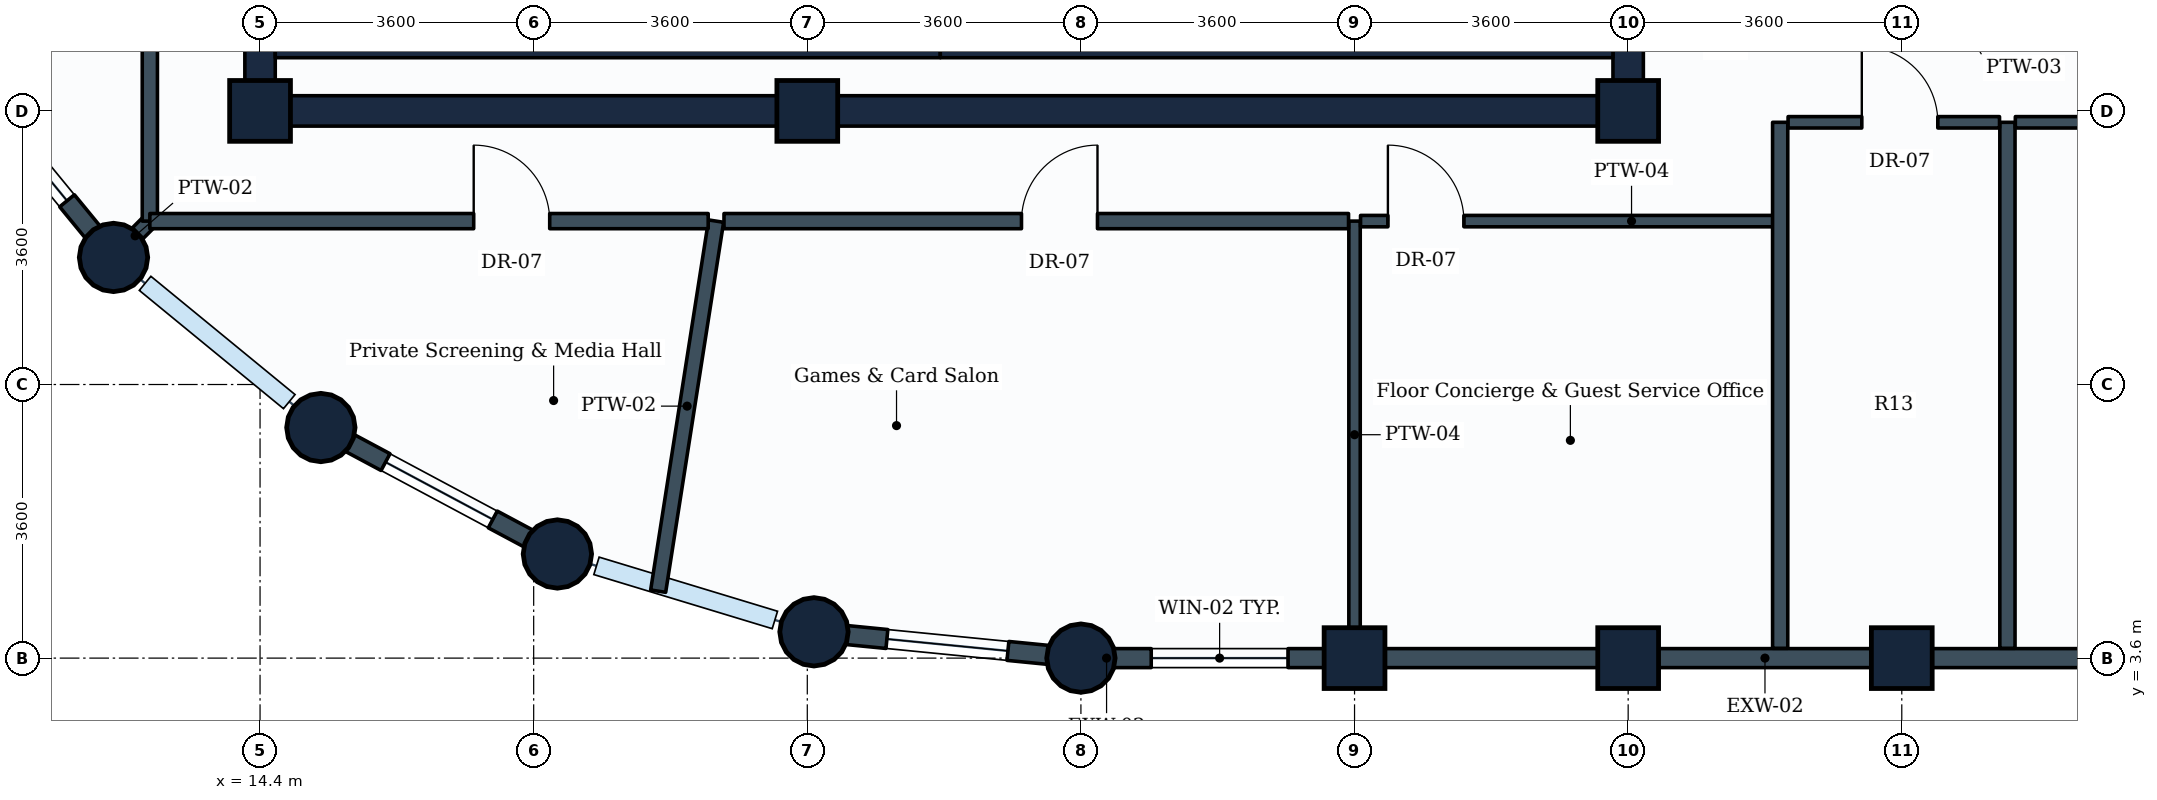
"""IFC4 building model, lengths in metres.
Left out: names, types, materials, properties, quantities, classifications, styles, units other than length and angle.
Written with IfcOpenShell. Run it as: python <this file> out.ifc"""

import sys

from ifc_helpers import new_model, si_unit, direction, frame, frame_2d, origin, origin_2d, place, context, subcontext, project, spatial, rectangle, circle, extrude, element, fill, save


model = new_model("IFC4")
c1 = context("Model", 3, precision=1e-05, world=origin(), true_north=direction((0.0, 1.0)))
c2 = subcontext(c1, "Body", "Model", "MODEL_VIEW")
j1 = project(units=[si_unit("LENGTHUNIT", "METRE"), si_unit("PLANEANGLEUNIT", "RADIAN")], contexts=[c1])
p1 = place(None, origin())
s1 = spatial("IfcSite", under=j1, at=p1, CompositionType="ELEMENT")
p2 = place(p1, origin())
s2 = spatial("IfcBuilding", under=s1, at=p2, CompositionType="ELEMENT")
p3 = place(p2, frame((0.0, 0.0, 228.2)))
s3 = spatial("IfcBuildingStorey", under=s2, at=p3, CompositionType="ELEMENT", Elevation=228.2)
p4 = place(p3, frame((12.472, 8.872, 0.0), z_axis=(0.0, 0.0, 1.0), x_axis=(1.0, 0.0, 0.0)))
e1 = element("IfcColumn", 1, at=p4, inside=s3, PredefinedType="COLUMN", context=c2, shape_type="SweptSolid", body=[
    extrude(circle(Radius=0.45, at=origin_2d()), origin(), (0.0, 0.0, 1.0), 3.6),
])
p5 = place(p3, frame((14.4, 10.8, 0.0), z_axis=(0.0, 0.0, 1.0), x_axis=(1.0, 0.0, 0.0)))
e2 = element("IfcColumn", 2, at=p5, inside=s3, PredefinedType="COLUMN", context=c2, shape_type="SweptSolid", body=[
    extrude(rectangle(XDim=0.8, YDim=0.8, at=origin_2d()), origin(), (0.0, 0.0, 1.0), 3.6),
])
for number, where, z_axis, x_axis in (
    (3, (15.2, 6.634, 0.0), (0.0, 0.0, 1.0), (1.0, 0.0, 0.0)),
    (4, (18.312, 4.97, 0.0), (0.0, 0.0, 1.0), (1.0, 0.0, 0.0)),
):
    element("IfcColumn", number, at=place(p3, frame(where, z_axis=z_axis, x_axis=x_axis)), inside=s3, PredefinedType="COLUMN", context=c2, shape_type="SweptSolid", body=[
        extrude(circle(Radius=0.45, at=origin_2d()), origin(), (0.0, 0.0, 1.0), 3.6),
    ])
p6 = place(p3, frame((21.6, 10.8, 0.0), z_axis=(0.0, 0.0, 1.0), x_axis=(1.0, 0.0, 0.0)))
e5 = element("IfcColumn", 5, at=p6, inside=s3, PredefinedType="COLUMN", context=c2, shape_type="SweptSolid", body=[
    extrude(rectangle(XDim=0.8, YDim=0.8, at=origin_2d()), origin(), (0.0, 0.0, 1.0), 3.6),
])
for number, where, z_axis, x_axis in (
    (6, (21.688, 3.946, 0.0), (0.0, 0.0, 1.0), (1.0, 0.0, 0.0)),
    (7, (25.2, 3.6, 0.0), (0.0, 0.0, 1.0), (1.0, 0.0, 0.0)),
):
    element("IfcColumn", number, at=place(p3, frame(where, z_axis=z_axis, x_axis=x_axis)), inside=s3, PredefinedType="COLUMN", context=c2, shape_type="SweptSolid", body=[
        extrude(circle(Radius=0.45, at=origin_2d()), origin(), (0.0, 0.0, 1.0), 3.6),
    ])
for number, where, z_axis, x_axis in (
    (8, (28.8, 3.6, 0.0), (0.0, 0.0, 1.0), (1.0, 0.0, 0.0)),
    (9, (32.4, 3.6, 0.0), (0.0, 0.0, 1.0), (1.0, 0.0, 0.0)),
    (10, (32.4, 10.8, 0.0), (0.0, 0.0, 1.0), (1.0, 0.0, 0.0)),
    (11, (36.0, 3.6, 0.0), (0.0, 0.0, 1.0), (1.0, 0.0, 0.0)),
):
    element("IfcColumn", number, at=place(p3, frame(where, z_axis=z_axis, x_axis=x_axis)), inside=s3, PredefinedType="COLUMN", context=c2, shape_type="SweptSolid", body=[
        extrude(rectangle(XDim=0.8, YDim=0.8, at=origin_2d()), origin(), (0.0, 0.0, 1.0), 3.6),
    ])
p7 = place(p3, frame((28.8, 3.6, 0.0), z_axis=(0.0, 0.0, 1.0), x_axis=(-1.0, 0.0, 0.0)))
e12 = element("IfcWall", 12, at=p7, inside=s3, PredefinedType="STANDARD", context=c2, shape_type="SweptSolid", body=[
    extrude(rectangle(XDim=3.6, YDim=0.25, at=frame_2d((1.8, 0.0))), origin(), (0.0, 0.0, 1.0), 2.83),
])
p8 = place(p7, frame((0.875, 0.0, 0.85)))
e13 = element("IfcOpeningElement", 13, at=p8, cuts=e12, PredefinedType="OPENING", context=c2, shape_type="SweptSolid", body=[
    extrude(rectangle(XDim=1.8, YDim=1.35, at=frame_2d((0.9, 0.675))), frame((0.0, 0.135, 0.0), z_axis=(0.0, -1.0, 0.0), x_axis=(1.0, 0.0, 0.0)), (0.0, 0.0, 1.0), 0.27),
])
p9 = place(p3, frame((32.4, 3.6, 0.0), z_axis=(0.0, 0.0, 1.0), x_axis=(-1.0, 0.0, 0.0)))
e14 = element("IfcWall", 14, at=p9, inside=s3, PredefinedType="STANDARD", context=c2, shape_type="SweptSolid", body=[
    extrude(rectangle(XDim=3.6, YDim=0.25, at=frame_2d((1.8, 0.0))), origin(), (0.0, 0.0, 1.0), 2.83),
])
for number, where, z_axis, x_axis in (
    (15, (36.0, 3.6, 0.0), (0.0, 0.0, 1.0), (-1.0, 0.0, 0.0)),
    (16, (39.6, 3.6, 0.0), (0.0, 0.0, 1.0), (-1.0, 0.0, 0.0)),
):
    element("IfcWall", number, at=place(p3, frame(where, z_axis=z_axis, x_axis=x_axis)), inside=s3, PredefinedType="STANDARD", context=c2, shape_type="SweptSolid", body=[
        extrude(rectangle(XDim=3.6, YDim=0.25, at=frame_2d((1.8, 0.0))), origin(), (0.0, 0.0, 1.0), 2.83),
    ])
p10 = place(p3, frame((12.472, 8.872, 0.0), z_axis=(0.0, 0.0, 1.0), x_axis=(-0.634258295121, 0.773121216285, 0.0)))
e17 = element("IfcWall", 17, at=p10, inside=s3, PredefinedType="STANDARD", context=c2, shape_type="SweptSolid", body=[
    extrude(rectangle(XDim=3.529, YDim=0.25, at=frame_2d((1.764, 0.0))), origin(), (0.0, 0.0, 1.0), 2.83),
])
p11 = place(p10, frame((0.964, 0.0, 0.85)))
e18 = element("IfcOpeningElement", 18, at=p11, cuts=e17, PredefinedType="OPENING", context=c2, shape_type="SweptSolid", body=[
    extrude(rectangle(XDim=1.6, YDim=1.35, at=frame_2d((0.8, 0.675))), frame((0.0, 0.135, 0.0), z_axis=(0.0, -1.0, 0.0), x_axis=(1.0, 0.0, 0.0)), (0.0, 0.0, 1.0), 0.27),
])
p12 = place(p3, frame((18.312, 4.97, 0.0), z_axis=(0.0, 0.0, 1.0), x_axis=(-0.881846862014, 0.471535907389, 0.0)))
e19 = element("IfcWall", 19, at=p12, inside=s3, PredefinedType="STANDARD", context=c2, shape_type="SweptSolid", body=[
    extrude(rectangle(XDim=3.529, YDim=0.25, at=frame_2d((1.765, 0.0))), origin(), (0.0, 0.0, 1.0), 2.83),
])
p13 = place(p12, frame((0.964, 0.0, 0.85)))
e20 = element("IfcOpeningElement", 20, at=p13, cuts=e19, PredefinedType="OPENING", context=c2, shape_type="SweptSolid", body=[
    extrude(rectangle(XDim=1.6, YDim=1.35, at=frame_2d((0.8, 0.675))), frame((0.0, 0.135, 0.0), z_axis=(0.0, -1.0, 0.0), x_axis=(1.0, 0.0, 0.0)), (0.0, 0.0, 1.0), 0.27),
])
p14 = place(p3, frame((25.2, 3.6, 0.0), z_axis=(0.0, 0.0, 1.0), x_axis=(-0.995183369056, 0.098030923459, 0.0)))
e21 = element("IfcWall", 21, at=p14, inside=s3, PredefinedType="STANDARD", context=c2, shape_type="SweptSolid", body=[
    extrude(rectangle(XDim=3.529, YDim=0.25, at=frame_2d((1.765, 0.0))), origin(), (0.0, 0.0, 1.0), 2.83),
])
p15 = place(p14, frame((0.965, 0.0, 0.85)))
e22 = element("IfcOpeningElement", 22, at=p15, cuts=e21, PredefinedType="OPENING", context=c2, shape_type="SweptSolid", body=[
    extrude(rectangle(XDim=1.6, YDim=1.35, at=frame_2d((0.8, 0.675))), frame((0.0, 0.135, 0.0), z_axis=(0.0, -1.0, 0.0), x_axis=(1.0, 0.0, 0.0)), (0.0, 0.0, 1.0), 0.27),
])
p16 = place(p3, frame((14.4, 10.8, 0.0), z_axis=(0.0, 0.0, 1.0), x_axis=(1.0, 0.0, 0.0)))
e23 = element("IfcWall", 23, at=p16, inside=s3, PredefinedType="SHEAR", context=c2, shape_type="SweptSolid", body=[
    extrude(rectangle(XDim=18.0, YDim=0.4, at=frame_2d((9.0, 0.0))), origin(), (0.0, 0.0, 1.0), 3.35),
])
p17 = place(p3, frame((14.4, 10.8, 0.0), z_axis=(0.0, 0.0, 1.0), x_axis=(0.0, 1.0, 0.0)))
e24 = element("IfcWall", 24, at=p17, inside=s3, PredefinedType="SHEAR", context=c2, shape_type="SweptSolid", body=[
    extrude(rectangle(XDim=14.4, YDim=0.4, at=frame_2d((7.2, 0.0))), origin(), (0.0, 0.0, 1.0), 3.35),
])
p18 = place(p17, frame((11.05, 0.0, 0.0)))
e25 = element("IfcOpeningElement", 25, at=p18, cuts=e24, PredefinedType="OPENING", context=c2, shape_type="SweptSolid", body=[
    extrude(rectangle(XDim=1.1, YDim=2.1, at=frame_2d((0.55, 1.05))), frame((0.0, 0.21, 0.0), z_axis=(0.0, -1.0, 0.0), x_axis=(1.0, 0.0, 0.0)), (0.0, 0.0, 1.0), 0.42),
])
p19 = place(p17, frame((4.9, 0.0, 0.0)))
e26 = element("IfcOpeningElement", 26, at=p19, cuts=e24, PredefinedType="OPENING", context=c2, shape_type="SweptSolid", body=[
    extrude(rectangle(XDim=1.2, YDim=2.1, at=frame_2d((0.6, 1.05))), frame((0.0, 0.21, 0.0), z_axis=(0.0, -1.0, 0.0), x_axis=(1.0, 0.0, 0.0)), (0.0, 0.0, 1.0), 0.42),
])
p20 = place(p17, frame((8.15, 0.0, 0.0)))
e27 = element("IfcOpeningElement", 27, at=p20, cuts=e24, PredefinedType="OPENING", context=c2, shape_type="SweptSolid", body=[
    extrude(rectangle(XDim=0.9, YDim=2.1, at=frame_2d((0.45, 1.05))), frame((0.0, 0.21, 0.0), z_axis=(0.0, -1.0, 0.0), x_axis=(1.0, 0.0, 0.0)), (0.0, 0.0, 1.0), 0.42),
])
p21 = place(p3, frame((32.4, 10.8, 0.0), z_axis=(0.0, 0.0, 1.0), x_axis=(0.0, 1.0, 0.0)))
e28 = element("IfcWall", 28, at=p21, inside=s3, PredefinedType="SHEAR", context=c2, shape_type="SweptSolid", body=[
    extrude(rectangle(XDim=14.4, YDim=0.4, at=frame_2d((7.2, 0.0))), origin(), (0.0, 0.0, 1.0), 3.35),
])
p22 = place(p21, frame((4.35, 0.0, 0.0)))
e29 = element("IfcOpeningElement", 29, at=p22, cuts=e28, PredefinedType="OPENING", context=c2, shape_type="SweptSolid", body=[
    extrude(rectangle(XDim=1.2, YDim=2.1, at=frame_2d((0.6, 1.05))), frame((0.0, 0.21, 0.0), z_axis=(0.0, -1.0, 0.0), x_axis=(1.0, 0.0, 0.0)), (0.0, 0.0, 1.0), 0.42),
])
p23 = place(p21, frame((10.0, 0.0, 0.0)))
e30 = element("IfcOpeningElement", 30, at=p23, cuts=e28, PredefinedType="OPENING", context=c2, shape_type="SweptSolid", body=[
    extrude(rectangle(XDim=1.2, YDim=2.1, at=frame_2d((0.6, 1.05))), frame((0.0, 0.21, 0.0), z_axis=(0.0, -1.0, 0.0), x_axis=(1.0, 0.0, 0.0)), (0.0, 0.0, 1.0), 0.42),
])
p24 = place(p3, frame((14.6, 11.625, 0.0), z_axis=(0.0, 0.0, 1.0), x_axis=(1.0, 0.0, 0.0)))
e31 = element("IfcWall", 31, at=p24, inside=s3, PredefinedType="SHEAR", context=c2, shape_type="SweptSolid", body=[
    extrude(rectangle(XDim=8.75, YDim=0.25, at=frame_2d((4.375, 0.0))), origin(), (0.0, 0.0, 1.0), 3.35),
])
p25 = place(p3, frame((23.35, 11.625, 0.0), z_axis=(0.0, 0.0, 1.0), x_axis=(1.0, 0.0, 0.0)))
e32 = element("IfcWall", 32, at=p25, inside=s3, PredefinedType="SHEAR", context=c2, shape_type="SweptSolid", body=[
    extrude(rectangle(XDim=8.85, YDim=0.25, at=frame_2d((4.425, 0.0))), origin(), (0.0, 0.0, 1.0), 3.35),
])
p26 = place(p3, frame((28.8, 9.35, 0.0), z_axis=(0.0, 0.0, 1.0), x_axis=(0.0, -1.0, 0.0)))
e33 = element("IfcWall", 33, at=p26, inside=s3, PredefinedType="PARTITIONING", context=c2, shape_type="SweptSolid", body=[
    extrude(rectangle(XDim=5.621, YDim=0.15, at=frame_2d((2.811, 0.0))), origin(), (0.0, 0.0, 1.0), 3.335),
])
p27 = place(p3, frame((12.95, 9.35, 0.0), z_axis=(0.0, 0.0, 1.0), x_axis=(-0.706883613527, -0.707329878435, 0.0)))
e34 = element("IfcWall", 34, at=p27, inside=s3, PredefinedType="PARTITIONING", context=c2, shape_type="SweptSolid", body=[
    extrude(rectangle(XDim=0.547, YDim=0.2, at=frame_2d((0.273, 0.0))), origin(), (0.0, 0.0, 1.0), 3.02),
])
p28 = place(p3, frame((20.4, 9.35, 0.0), z_axis=(0.0, 0.0, 1.0), x_axis=(-0.154606571481, -0.987976117148, 0.0)))
e35 = element("IfcWall", 35, at=p28, inside=s3, PredefinedType="PARTITIONING", context=c2, shape_type="SweptSolid", body=[
    extrude(rectangle(XDim=4.928, YDim=0.2, at=frame_2d((2.464, 0.0))), origin(), (0.0, 0.0, 1.0), 2.83),
])
p29 = place(p3, frame((12.95, 9.35, 0.0), z_axis=(0.0, 0.0, 1.0), x_axis=(0.0, 1.0, 0.0)))
e36 = element("IfcWall", 36, at=p29, inside=s3, PredefinedType="PARTITIONING", context=c2, shape_type="SweptSolid", body=[
    extrude(rectangle(XDim=7.346, YDim=0.2, at=frame_2d((3.673, 0.0))), origin(), (0.0, 0.0, 1.0), 3.02),
])
p30 = place(p29, frame((4.261, 0.0, 0.0)))
e37 = element("IfcOpeningElement", 37, at=p30, cuts=e36, PredefinedType="OPENING", context=c2, shape_type="SweptSolid", body=[
    extrude(rectangle(XDim=1.0, YDim=2.1, at=frame_2d((0.5, 1.05))), frame((0.0, 0.11, 0.0), z_axis=(0.0, -1.0, 0.0), x_axis=(1.0, 0.0, 0.0)), (0.0, 0.0, 1.0), 0.22),
])
p31 = place(p3, frame((12.95, 9.35, 0.0), z_axis=(0.0, 0.0, 1.0), x_axis=(1.0, 0.0, 0.0)))
e38 = element("IfcWall", 38, at=p31, inside=s3, PredefinedType="PARTITIONING", context=c2, shape_type="SweptSolid", body=[
    extrude(rectangle(XDim=7.346, YDim=0.2, at=frame_2d((3.673, 0.0))), origin(), (0.0, 0.0, 1.0), 3.02),
])
p32 = place(p31, frame((4.261, 0.0, 0.0)))
e39 = element("IfcOpeningElement", 39, at=p32, cuts=e38, PredefinedType="OPENING", context=c2, shape_type="SweptSolid", body=[
    extrude(rectangle(XDim=1.0, YDim=2.1, at=frame_2d((0.5, 1.05))), frame((0.0, 0.11, 0.0), z_axis=(0.0, -1.0, 0.0), x_axis=(1.0, 0.0, 0.0)), (0.0, 0.0, 1.0), 0.22),
])
p33 = place(p3, frame((20.504, 9.35, 0.0), z_axis=(0.0, 0.0, 1.0), x_axis=(1.0, 0.0, 0.0)))
e40 = element("IfcWall", 40, at=p33, inside=s3, PredefinedType="PARTITIONING", context=c2, shape_type="SweptSolid", body=[
    extrude(rectangle(XDim=8.217, YDim=0.2, at=frame_2d((4.108, 0.0))), origin(), (0.0, 0.0, 1.0), 3.02),
])
p34 = place(p33, frame((3.914, 0.0, 0.0)))
e41 = element("IfcOpeningElement", 41, at=p34, cuts=e40, PredefinedType="OPENING", context=c2, shape_type="SweptSolid", body=[
    extrude(rectangle(XDim=1.0, YDim=2.1, at=frame_2d((0.5, 1.05))), frame((0.0, 0.11, 0.0), z_axis=(0.0, -1.0, 0.0), x_axis=(1.0, 0.0, 0.0)), (0.0, 0.0, 1.0), 0.22),
])
p35 = place(p3, frame((28.879, 9.35, 0.0), z_axis=(0.0, 0.0, 1.0), x_axis=(1.0, 0.0, 0.0)))
e42 = element("IfcWall", 42, at=p35, inside=s3, PredefinedType="PARTITIONING", context=c2, shape_type="SweptSolid", body=[
    extrude(rectangle(XDim=5.521, YDim=0.15, at=frame_2d((2.76, 0.0))), origin(), (0.0, 0.0, 1.0), 3.335),
])
p36 = place(p35, frame((0.36, 0.0, 0.0)))
e43 = element("IfcOpeningElement", 43, at=p36, cuts=e42, PredefinedType="OPENING", context=c2, shape_type="SweptSolid", body=[
    extrude(rectangle(XDim=1.0, YDim=2.1, at=frame_2d((0.5, 1.05))), frame((0.0, 0.085, 0.0), z_axis=(0.0, -1.0, 0.0), x_axis=(1.0, 0.0, 0.0)), (0.0, 0.0, 1.0), 0.17),
])
for number, where, z_axis, x_axis in (
    (44, (34.4, 3.729, 0.0), (0.0, 0.0, 1.0), (0.0, 1.0, 0.0)),
    (45, (37.39, 3.729, 0.0), (0.0, 0.0, 1.0), (0.0, 1.0, 0.0)),
):
    element("IfcWall", number, at=place(p3, frame(where, z_axis=z_axis, x_axis=x_axis)), inside=s3, PredefinedType="PARTITIONING", context=c2, shape_type="SweptSolid", body=[
        extrude(rectangle(XDim=6.921, YDim=0.2, at=frame_2d((3.46, 0.0))), origin(), (0.0, 0.0, 1.0), 2.83),
    ])
p37 = place(p3, frame((34.504, 10.65, 0.0), z_axis=(0.0, 0.0, 1.0), x_axis=(1.0, 0.0, 0.0)))
e46 = element("IfcWall", 46, at=p37, inside=s3, PredefinedType="PARTITIONING", context=c2, shape_type="SweptSolid", body=[
    extrude(rectangle(XDim=2.782, YDim=0.15, at=frame_2d((1.391, 0.0))), origin(), (0.0, 0.0, 1.0), 3.02),
])
p38 = place(p37, frame((0.97, 0.0, 0.0)))
e47 = element("IfcOpeningElement", 47, at=p38, cuts=e46, PredefinedType="OPENING", context=c2, shape_type="SweptSolid", body=[
    extrude(rectangle(XDim=1.0, YDim=2.1, at=frame_2d((0.5, 1.05))), frame((0.0, 0.085, 0.0), z_axis=(0.0, -1.0, 0.0), x_axis=(1.0, 0.0, 0.0)), (0.0, 0.0, 1.0), 0.17),
])
p39 = place(p3, frame((37.494, 10.65, 0.0), z_axis=(0.0, 0.0, 1.0), x_axis=(1.0, 0.0, 0.0)))
e48 = element("IfcWall", 48, at=p39, inside=s3, PredefinedType="PARTITIONING", context=c2, shape_type="SweptSolid", body=[
    extrude(rectangle(XDim=2.752, YDim=0.15, at=frame_2d((1.376, 0.0))), origin(), (0.0, 0.0, 1.0), 3.335),
])
p40 = place(p39, frame((0.876, 0.0, 0.0)))
e49 = element("IfcOpeningElement", 49, at=p40, cuts=e48, PredefinedType="OPENING", context=c2, shape_type="SweptSolid", body=[
    extrude(rectangle(XDim=1.0, YDim=2.1, at=frame_2d((0.5, 1.05))), frame((0.0, 0.085, 0.0), z_axis=(0.0, -1.0, 0.0), x_axis=(1.0, 0.0, 0.0)), (0.0, 0.0, 1.0), 0.17),
])
p41 = place(p8, origin())
e50 = element("IfcWindow", 50, at=p41, inside=s3, PartitioningType="SINGLE_PANEL", PredefinedType="WINDOW", context=c2, shape_type="SweptSolid", body=[
    extrude(rectangle(XDim=1.8, YDim=1.35, at=frame_2d((0.9, 0.675))), frame((0.0, 0.03, 0.0), z_axis=(0.0, -1.0, 0.0), x_axis=(1.0, 0.0, 0.0)), (0.0, 0.0, 1.0), 0.06),
])
fill(e13, e50)
p42 = place(p11, origin())
e51 = element("IfcWindow", 51, at=p42, inside=s3, PartitioningType="SINGLE_PANEL", PredefinedType="WINDOW", context=c2, shape_type="SweptSolid", body=[
    extrude(rectangle(XDim=1.6, YDim=1.35, at=frame_2d((0.8, 0.675))), frame((0.0, 0.03, 0.0), z_axis=(0.0, -1.0, 0.0), x_axis=(1.0, 0.0, 0.0)), (0.0, 0.0, 1.0), 0.06),
])
fill(e18, e51)
p43 = place(p13, origin())
e52 = element("IfcWindow", 52, at=p43, inside=s3, PartitioningType="SINGLE_PANEL", PredefinedType="WINDOW", context=c2, shape_type="SweptSolid", body=[
    extrude(rectangle(XDim=1.6, YDim=1.35, at=frame_2d((0.8, 0.675))), frame((0.0, 0.03, 0.0), z_axis=(0.0, -1.0, 0.0), x_axis=(1.0, 0.0, 0.0)), (0.0, 0.0, 1.0), 0.06),
])
fill(e20, e52)
p44 = place(p15, origin())
e53 = element("IfcWindow", 53, at=p44, inside=s3, PartitioningType="SINGLE_PANEL", PredefinedType="WINDOW", context=c2, shape_type="SweptSolid", body=[
    extrude(rectangle(XDim=1.6, YDim=1.35, at=frame_2d((0.8, 0.675))), frame((0.0, 0.03, 0.0), z_axis=(0.0, -1.0, 0.0), x_axis=(1.0, 0.0, 0.0)), (0.0, 0.0, 1.0), 0.06),
])
fill(e22, e53)
p45 = place(p32, origin())
e54 = element("IfcDoor", 54, at=p45, inside=s3, OperationType="SINGLE_SWING_LEFT", PredefinedType="DOOR", context=c2, shape_type="SweptSolid", body=[
    extrude(rectangle(XDim=1.0, YDim=2.1, at=frame_2d((0.5, 1.05))), frame((0.0, 0.025, 0.0), z_axis=(0.0, -1.0, 0.0), x_axis=(1.0, 0.0, 0.0)), (0.0, 0.0, 1.0), 0.05),
])
fill(e39, e54)
p46 = place(p34, origin())
e55 = element("IfcDoor", 55, at=p46, inside=s3, OperationType="SINGLE_SWING_RIGHT", PredefinedType="DOOR", context=c2, shape_type="SweptSolid", body=[
    extrude(rectangle(XDim=1.0, YDim=2.1, at=frame_2d((0.5, 1.05))), frame((0.0, 0.025, 0.0), z_axis=(0.0, -1.0, 0.0), x_axis=(1.0, 0.0, 0.0)), (0.0, 0.0, 1.0), 0.05),
])
fill(e41, e55)
p47 = place(p36, origin())
e56 = element("IfcDoor", 56, at=p47, inside=s3, OperationType="SINGLE_SWING_LEFT", PredefinedType="DOOR", context=c2, shape_type="SweptSolid", body=[
    extrude(rectangle(XDim=1.0, YDim=2.1, at=frame_2d((0.5, 1.05))), frame((0.0, 0.025, 0.0), z_axis=(0.0, -1.0, 0.0), x_axis=(1.0, 0.0, 0.0)), (0.0, 0.0, 1.0), 0.05),
])
fill(e43, e56)
p48 = place(p38, origin())
e57 = element("IfcDoor", 57, at=p48, inside=s3, OperationType="SINGLE_SWING_LEFT", PredefinedType="DOOR", context=c2, shape_type="SweptSolid", body=[
    extrude(rectangle(XDim=1.0, YDim=2.1, at=frame_2d((0.5, 1.05))), frame((0.0, 0.025, 0.0), z_axis=(0.0, -1.0, 0.0), x_axis=(1.0, 0.0, 0.0)), (0.0, 0.0, 1.0), 0.05),
])
fill(e47, e57)
save(model, sys.argv[1])
